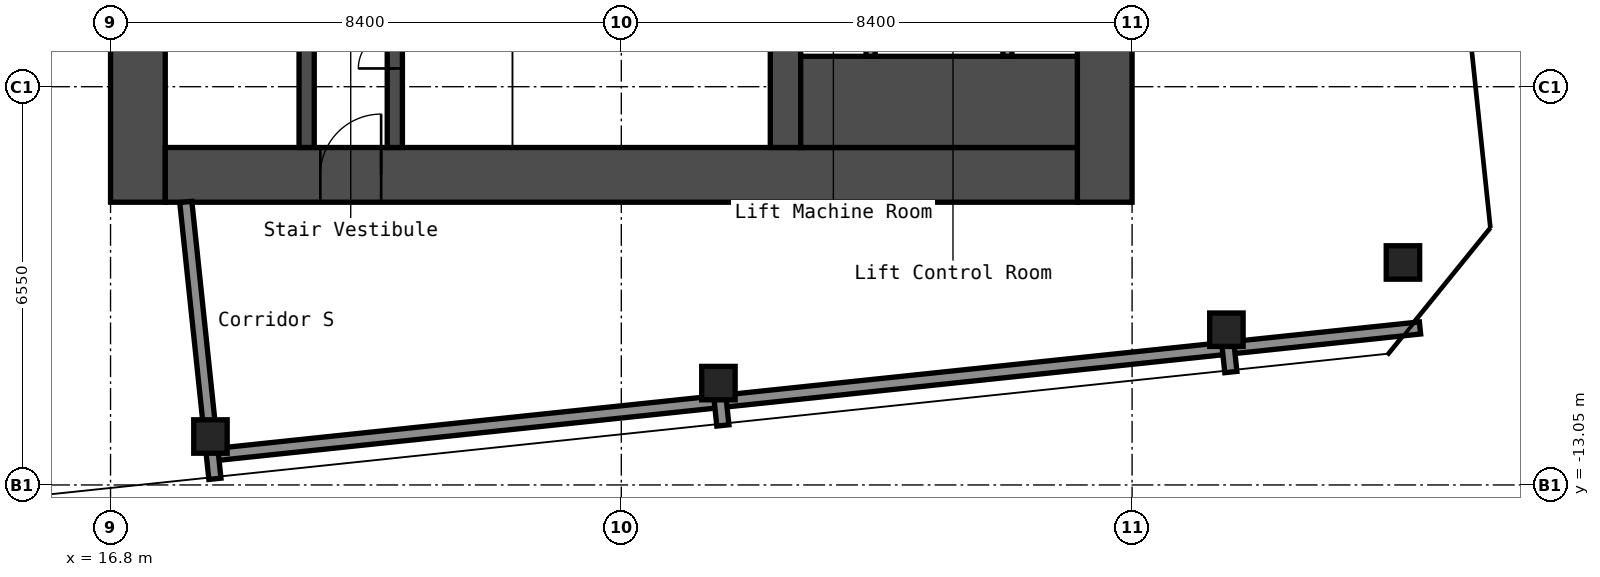
"""IFC4 building model, lengths in metres.
Left out: names, types, materials, properties, quantities, classifications, styles, units other than length and angle.
Written with IfcOpenShell. Run it as: python <this file> out.ifc"""

import sys

from ifc_helpers import new_model, si_unit, direction, frame, frame_2d, origin, origin_2d, place, context, subcontext, project, spatial, rectangle, hollow_rectangle, extrude, element, fill, save


model = new_model("IFC4")
c1 = context("Model", 3, precision=1e-05, world=origin(), true_north=direction((0.0, 1.0)))
c2 = subcontext(c1, "Body", "Model", "MODEL_VIEW")
j1 = project(units=[si_unit("LENGTHUNIT", "METRE"), si_unit("PLANEANGLEUNIT", "RADIAN")], contexts=[c1])
p1 = place(None, origin())
s1 = spatial("IfcSite", under=j1, at=p1, CompositionType="ELEMENT")
p2 = place(p1, origin())
s2 = spatial("IfcBuilding", under=s1, at=p2, CompositionType="ELEMENT")
p3 = place(p2, frame((0.0, 0.0, 280.8)))
s3 = spatial("IfcBuildingStorey", under=s2, at=p3, CompositionType="ELEMENT", Elevation=280.8)
for number, where, z_axis, x_axis in (
    (1, (18.443, -12.253, 0.0), (0.0, 0.0, 1.0), (1.0, 0.0, 0.0)),
    (2, (26.797, -11.375, 0.0), (0.0, 0.0, 1.0), (1.0, 0.0, 0.0)),
    (3, (35.151, -10.497, 0.0), (0.0, 0.0, 1.0), (1.0, 0.0, 0.0)),
    (4, (38.054, -9.39, 0.0), (0.0, 0.0, 1.0), (1.0, 0.0, 0.0)),
):
    element("IfcColumn", number, at=place(p3, frame(where, z_axis=z_axis, x_axis=x_axis)), inside=s3, PredefinedType="COLUMN", context=c2, shape_type="SweptSolid", body=[
        extrude(hollow_rectangle(XDim=0.55, YDim=0.55, WallThickness=0.022, InnerFilletRadius=0.033, OuterFilletRadius=0.055, at=origin_2d()), origin(), (0.0, 0.0, 1.0), 4.0),
    ])
p4 = place(p3, frame((17.25, -8.4, 0.0), z_axis=(0.0, 0.0, 1.0), x_axis=(0.0, 1.0, 0.0)))
e5 = element("IfcWall", 5, at=p4, inside=s3, PredefinedType="SHEAR", context=c2, shape_type="SweptSolid", body=[
    extrude(rectangle(XDim=16.8, YDim=0.9, at=frame_2d((8.4, 0.0))), origin(), (0.0, 0.0, 1.0), 4.0),
])
p5 = place(p4, frame((9.6, 0.0, 0.0)))
e6 = element("IfcOpeningElement", 6, at=p5, cuts=e5, PredefinedType="OPENING", context=c2, shape_type="SweptSolid", body=[
    extrude(rectangle(XDim=1.6, YDim=2.1, at=frame_2d((0.8, 1.05))), frame((0.0, 0.46, 0.0), z_axis=(0.0, -1.0, 0.0), x_axis=(1.0, 0.0, 0.0)), (0.0, 0.0, 1.0), 0.92),
])
p6 = place(p3, frame((33.15, -8.4, 0.0), z_axis=(0.0, 0.0, 1.0), x_axis=(0.0, 1.0, 0.0)))
e7 = element("IfcWall", 7, at=p6, inside=s3, PredefinedType="SHEAR", context=c2, shape_type="SweptSolid", body=[
    extrude(rectangle(XDim=16.8, YDim=0.9, at=frame_2d((8.4, 0.0))), origin(), (0.0, 0.0, 1.0), 4.0),
])
p7 = place(p3, frame((17.7, -7.95, 0.0), z_axis=(0.0, 0.0, 1.0), x_axis=(1.0, 0.0, 0.0)))
e8 = element("IfcWall", 8, at=p7, inside=s3, PredefinedType="SHEAR", context=c2, shape_type="SweptSolid", body=[
    extrude(rectangle(XDim=15.0, YDim=0.9, at=frame_2d((7.5, 0.0))), origin(), (0.0, 0.0, 1.0), 4.0),
])
p8 = place(p7, frame((2.55, 0.0, 0.0)))
e9 = element("IfcOpeningElement", 9, at=p8, cuts=e8, PredefinedType="OPENING", context=c2, shape_type="SweptSolid", body=[
    extrude(rectangle(XDim=1.0, YDim=2.1, at=frame_2d((0.5, 1.05))), frame((0.0, 0.46, 0.0), z_axis=(0.0, -1.0, 0.0), x_axis=(1.0, 0.0, 0.0)), (0.0, 0.0, 1.0), 0.92),
])
p9 = place(p3, frame((20.025, -7.5, 0.0), z_axis=(0.0, 0.0, 1.0), x_axis=(0.0, 1.0, 0.0)))
e10 = element("IfcWall", 10, at=p9, inside=s3, PredefinedType="SHEAR", context=c2, shape_type="SweptSolid", body=[
    extrude(rectangle(XDim=6.3, YDim=0.25, at=frame_2d((3.15, 0.0))), origin(), (0.0, 0.0, 1.0), 4.0),
])
p10 = place(p9, frame((2.4, 0.0, 0.0)))
e11 = element("IfcOpeningElement", 11, at=p10, cuts=e10, PredefinedType="OPENING", context=c2, shape_type="SweptSolid", body=[
    extrude(rectangle(XDim=1.0, YDim=2.1, at=frame_2d((0.5, 1.05))), frame((0.0, 0.135, 0.0), z_axis=(0.0, -1.0, 0.0), x_axis=(1.0, 0.0, 0.0)), (0.0, 0.0, 1.0), 0.27),
])
p11 = place(p3, frame((21.475, -7.5, 0.0), z_axis=(0.0, 0.0, 1.0), x_axis=(0.0, 1.0, 0.0)))
e12 = element("IfcWall", 12, at=p11, inside=s3, PredefinedType="SHEAR", context=c2, shape_type="SweptSolid", body=[
    extrude(rectangle(XDim=3.75, YDim=0.25, at=frame_2d((1.875, 0.0))), origin(), (0.0, 0.0, 1.0), 4.0),
])
p12 = place(p11, frame((1.3, 0.0, 0.0)))
e13 = element("IfcOpeningElement", 13, at=p12, cuts=e12, PredefinedType="OPENING", context=c2, shape_type="SweptSolid", body=[
    extrude(rectangle(XDim=1.2, YDim=2.1, at=frame_2d((0.6, 1.05))), frame((0.0, 0.135, 0.0), z_axis=(0.0, -1.0, 0.0), x_axis=(1.0, 0.0, 0.0)), (0.0, 0.0, 1.0), 0.27),
])
p13 = place(p3, frame((27.9, -7.5, 0.0), z_axis=(0.0, 0.0, 1.0), x_axis=(0.0, 1.0, 0.0)))
e14 = element("IfcWall", 14, at=p13, inside=s3, PredefinedType="SHEAR", context=c2, shape_type="SweptSolid", body=[
    extrude(rectangle(XDim=3.75, YDim=0.5, at=frame_2d((1.875, 0.0))), origin(), (0.0, 0.0, 1.0), 4.0),
])
p14 = place(p3, frame((28.15, -6.75, 0.0), z_axis=(0.0, 0.0, 1.0), x_axis=(1.0, 0.0, 0.0)))
e15 = element("IfcWall", 15, at=p14, inside=s3, PredefinedType="SHEAR", context=c2, shape_type="SweptSolid", body=[
    extrude(rectangle(XDim=4.55, YDim=1.5, at=frame_2d((2.275, 0.0))), origin(), (0.0, 0.0, 1.0), 4.0),
])
for number, where, z_axis, x_axis in (
    (16, (29.3, -6.0, 0.0), (0.0, 0.0, 1.0), (0.0, 1.0, 0.0)),
    (17, (31.55, -6.0, 0.0), (0.0, 0.0, 1.0), (0.0, 1.0, 0.0)),
):
    element("IfcWall", number, at=place(p3, frame(where, z_axis=z_axis, x_axis=x_axis)), inside=s3, PredefinedType="PARTITIONING", context=c2, shape_type="SweptSolid", body=[
        extrude(rectangle(XDim=2.25, YDim=0.15, at=frame_2d((1.125, 0.0))), origin(), (0.0, 0.0, 1.0), 4.0),
    ])
p15 = place(p3, frame((18.475, -12.555, 0.0), z_axis=(0.0, 0.0, 1.0), x_axis=(0.994522053511, 0.104526958629, 0.0)))
e18 = element("IfcWall", 18, at=p15, inside=s3, PredefinedType="PARTITIONING", context=c2, shape_type="SweptSolid", body=[
    extrude(rectangle(XDim=19.97, YDim=0.2, at=frame_2d((9.985, 0.0))), origin(), (0.0, 0.0, 1.0), 4.0),
])
p16 = place(p3, frame((18.516, -12.949, 0.0), z_axis=(0.0, 0.0, 1.0), x_axis=(-0.104548796268, 0.994519758074, 0.0)))
e19 = element("IfcWall", 19, at=p16, inside=s3, PredefinedType="PARTITIONING", context=c2, shape_type="SweptSolid", body=[
    extrude(rectangle(XDim=4.579, YDim=0.2, at=frame_2d((2.29, 0.0))), origin(), (0.0, 0.0, 1.0), 4.0),
])
for number, where, z_axis, x_axis in (
    (20, (26.87, -12.071, 0.0), (0.0, 0.0, 1.0), (-0.105, 0.994, 0.0)),
    (21, (35.224, -11.193, 0.0), (0.0, 0.0, 1.0), (-0.105, 0.994, 0.0)),
):
    element("IfcWall", number, at=place(p3, frame(where, z_axis=z_axis, x_axis=x_axis)), inside=s3, PredefinedType="PARTITIONING", context=c2, shape_type="SweptSolid", body=[
        extrude(rectangle(XDim=0.434, YDim=0.2, at=frame_2d((0.217, 0.0))), origin(), (0.0, 0.0, 1.0), 4.0),
    ])
p17 = place(p8, origin())
e22 = element("IfcDoor", 22, at=p17, inside=s3, OperationType="SINGLE_SWING_LEFT", PredefinedType="DOOR", context=c2, shape_type="SweptSolid", body=[
    extrude(rectangle(XDim=1.0, YDim=2.1, at=frame_2d((0.5, 1.05))), frame((0.0, 0.025, 0.0), z_axis=(0.0, -1.0, 0.0), x_axis=(1.0, 0.0, 0.0)), (0.0, 0.0, 1.0), 0.05),
])
fill(e9, e22)
p18 = place(p12, origin())
e23 = element("IfcDoor", 23, at=p18, inside=s3, OperationType="DOUBLE_DOOR_SINGLE_SWING", PredefinedType="DOOR", context=c2, shape_type="SweptSolid", body=[
    extrude(rectangle(XDim=1.2, YDim=2.1, at=frame_2d((0.6, 1.05))), frame((0.0, 0.025, 0.0), z_axis=(0.0, -1.0, 0.0), x_axis=(1.0, 0.0, 0.0)), (0.0, 0.0, 1.0), 0.05),
])
fill(e13, e23)
save(model, sys.argv[1])
